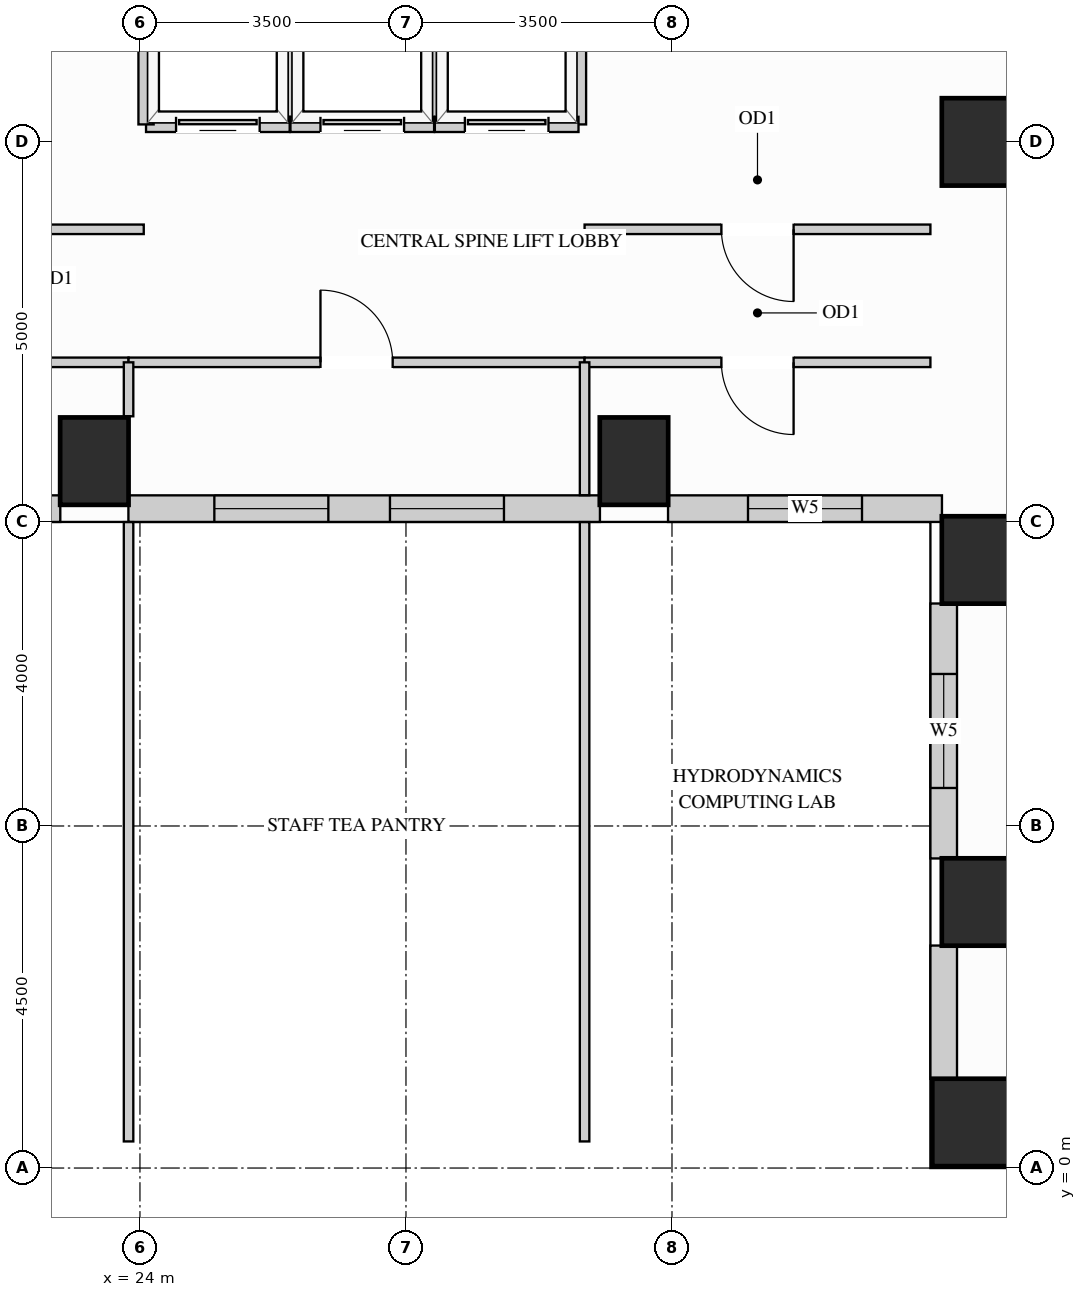
"""IFC4 building model, lengths in metres.
Left out: names, types, materials, properties, quantities, classifications, styles, units other than length and angle.
Written with IfcOpenShell. Run it as: python <this file> out.ifc"""

import sys

from ifc_helpers import new_model, si_unit, direction, frame, frame_2d, origin, origin_2d, place, context, subcontext, project, spatial, rectangle, extrude, source, transform, mapped, element, fill, save


model = new_model("IFC4")
c1 = context("Model", 3, precision=1e-05, world=origin(), true_north=direction((0.0, 1.0)))
c2 = subcontext(c1, "Body", "Model", "MODEL_VIEW")
j1 = project(units=[si_unit("LENGTHUNIT", "METRE"), si_unit("PLANEANGLEUNIT", "RADIAN")], contexts=[c1])
p1 = place(None, origin())
s1 = spatial("IfcSite", under=j1, at=p1, CompositionType="ELEMENT")
p2 = place(p1, origin())
s2 = spatial("IfcBuilding", under=s1, at=p2, CompositionType="ELEMENT")
p3 = place(p2, frame((0.0, 0.0, 120.6)))
s3 = spatial("IfcBuildingStorey", under=s2, at=p3, CompositionType="ELEMENT", Elevation=120.6)
m1 = source(origin(), c2, "Body", "SweptSolid", [
    extrude(rectangle(XDim=0.9, YDim=1.15, at=origin_2d()), origin(), (0.0, 0.0, 1.0), 3.38),
])
for number, where, z_axis, x_axis in (
    (1, (35.0, 13.5, 0.0), (0.0, 0.0, 1.0), (1.0, 0.0, 0.0)),
    (2, (35.0, 3.5, 0.0), (0.0, 0.0, 1.0), (1.0, 0.0, 0.0)),
    (3, (35.0, 8.0, 0.0), (0.0, 0.0, 1.0), (1.0, 0.0, 0.0)),
    (4, (23.4, 9.3, 0.0), (0.0, 0.0, 1.0), (1.0, 0.0, 0.0)),
    (5, (30.5, 9.3, 0.0), (0.0, 0.0, 1.0), (1.0, 0.0, 0.0)),
):
    element("IfcColumn", number, at=place(p3, frame(where, z_axis=z_axis, x_axis=x_axis)), inside=s3, PredefinedType="COLUMN", context=c2, shape_type="MappedRepresentation", body=[
        mapped(m1, transform((0.0, 0.0, 0.0), x_axis=(1.0, 0.0, 0.0), y_axis=(0.0, 1.0, 0.0), z_axis=(0.0, 0.0, 1.0))),
    ])
m2 = source(origin(), c2, "Body", "SweptSolid", [
    extrude(rectangle(XDim=1.15, YDim=1.15, at=origin_2d()), origin(), (0.0, 0.0, 1.0), 3.38),
])
p4 = place(p3, frame((35.0, 0.6, 0.0), z_axis=(0.0, 0.0, 1.0), x_axis=(1.0, 0.0, 0.0)))
e6 = element("IfcColumn", 6, at=p4, inside=s3, PredefinedType="COLUMN", context=c2, shape_type="MappedRepresentation", body=[
    mapped(m2, transform((0.0, 0.0, 0.0), x_axis=(1.0, 0.0, 0.0), y_axis=(0.0, 1.0, 0.0), z_axis=(0.0, 0.0, 1.0))),
])
p5 = place(p3, frame((19.448, 8.675, 0.0), z_axis=(0.0, 0.0, 1.0), x_axis=(1.0, 0.0, 0.0)))
e7 = element("IfcWall", 7, at=p5, inside=s3, PredefinedType="SOLIDWALL", context=c2, shape_type="SweptSolid", body=[
    extrude(rectangle(XDim=3.504, YDim=0.35, at=frame_2d((1.752, 0.0))), origin(), (0.0, 0.0, 1.0), 3.365),
])
p6 = place(p5, frame((1.002, 0.0, 0.78)))
e8 = element("IfcOpeningElement", 8, at=p6, cuts=e7, PredefinedType="OPENING", context=c2, shape_type="SweptSolid", body=[
    extrude(rectangle(XDim=1.5, YDim=2.0, at=frame_2d((0.75, 1.0))), frame((0.0, 0.185, 0.0), z_axis=(0.0, -1.0, 0.0), x_axis=(1.0, 0.0, 0.0)), (0.0, 0.0, 1.0), 0.37),
])
p7 = place(p3, frame((23.848, 8.675, 0.0), z_axis=(0.0, 0.0, 1.0), x_axis=(1.0, 0.0, 0.0)))
e9 = element("IfcWall", 9, at=p7, inside=s3, PredefinedType="SOLIDWALL", context=c2, shape_type="SweptSolid", body=[
    extrude(rectangle(XDim=6.204, YDim=0.35, at=frame_2d((3.102, 0.0))), origin(), (0.0, 0.0, 1.0), 3.365),
])
p8 = place(p7, frame((1.131, 0.0, 0.78)))
e10 = element("IfcOpeningElement", 10, at=p8, cuts=e9, PredefinedType="OPENING", context=c2, shape_type="SweptSolid", body=[
    extrude(rectangle(XDim=1.5, YDim=2.0, at=frame_2d((0.75, 1.0))), frame((0.0, 0.185, 0.0), z_axis=(0.0, -1.0, 0.0), x_axis=(1.0, 0.0, 0.0)), (0.0, 0.0, 1.0), 0.37),
])
p9 = place(p7, frame((3.441, 0.0, 0.78)))
e11 = element("IfcOpeningElement", 11, at=p9, cuts=e9, PredefinedType="OPENING", context=c2, shape_type="SweptSolid", body=[
    extrude(rectangle(XDim=1.5, YDim=2.0, at=frame_2d((0.75, 1.0))), frame((0.0, 0.185, 0.0), z_axis=(0.0, -1.0, 0.0), x_axis=(1.0, 0.0, 0.0)), (0.0, 0.0, 1.0), 0.37),
])
p10 = place(p3, frame((30.948, 8.675, 0.0), z_axis=(0.0, 0.0, 1.0), x_axis=(1.0, 0.0, 0.0)))
e12 = element("IfcWall", 12, at=p10, inside=s3, PredefinedType="SOLIDWALL", context=c2, shape_type="SweptSolid", body=[
    extrude(rectangle(XDim=3.604, YDim=0.35, at=frame_2d((1.802, 0.0))), origin(), (0.0, 0.0, 1.0), 3.365),
])
p11 = place(p10, frame((1.052, 0.0, 0.78)))
e13 = element("IfcOpeningElement", 13, at=p11, cuts=e12, PredefinedType="OPENING", context=c2, shape_type="SweptSolid", body=[
    extrude(rectangle(XDim=1.5, YDim=2.0, at=frame_2d((0.75, 1.0))), frame((0.0, 0.185, 0.0), z_axis=(0.0, -1.0, 0.0), x_axis=(1.0, 0.0, 0.0)), (0.0, 0.0, 1.0), 0.37),
])
p12 = place(p3, frame((34.575, 7.427, 0.0), z_axis=(0.0, 0.0, 1.0), x_axis=(0.0, -1.0, 0.0)))
e14 = element("IfcWall", 14, at=p12, inside=s3, PredefinedType="SOLIDWALL", context=c2, shape_type="SweptSolid", body=[
    extrude(rectangle(XDim=3.354, YDim=0.35, at=frame_2d((1.677, 0.0))), origin(), (0.0, 0.0, 1.0), 3.365),
])
p13 = place(p12, frame((0.927, 0.0, 0.78)))
e15 = element("IfcOpeningElement", 15, at=p13, cuts=e14, PredefinedType="OPENING", context=c2, shape_type="SweptSolid", body=[
    extrude(rectangle(XDim=1.5, YDim=2.0, at=frame_2d((0.75, 1.0))), frame((0.0, 0.185, 0.0), z_axis=(0.0, -1.0, 0.0), x_axis=(1.0, 0.0, 0.0)), (0.0, 0.0, 1.0), 0.37),
])
m3 = source(origin(), c2, "Body", "SweptSolid", [
    extrude(rectangle(XDim=1.754, YDim=0.35, at=frame_2d((0.877, 0.0))), origin(), (0.0, 0.0, 1.0), 3.365),
])
p14 = place(p3, frame((34.575, 2.927, 0.0), z_axis=(0.0, 0.0, 1.0), x_axis=(0.0, -1.0, 0.0)))
e16 = element("IfcWall", 16, at=p14, inside=s3, PredefinedType="SOLIDWALL", context=c2, shape_type="MappedRepresentation", body=[
    mapped(m3, transform((0.0, 0.0, 0.0), x_axis=(1.0, 0.0, 0.0), y_axis=(0.0, 1.0, 0.0), z_axis=(0.0, 0.0, 1.0))),
])
p15 = place(p3, frame((29.85, 12.35, 0.0), z_axis=(0.0, 0.0, 1.0), x_axis=(1.0, 0.0, 0.0)))
e17 = element("IfcWall", 17, at=p15, inside=s3, PredefinedType="PARTITIONING", context=c2, shape_type="SweptSolid", body=[
    extrude(rectangle(XDim=4.55, YDim=0.125, at=frame_2d((2.275, 0.0))), origin(), (0.0, 0.0, 1.0), 3.365),
])
p16 = place(p15, frame((1.8, 0.0, 0.0)))
e18 = element("IfcOpeningElement", 18, at=p16, cuts=e17, PredefinedType="OPENING", context=c2, shape_type="SweptSolid", body=[
    extrude(rectangle(XDim=0.95, YDim=2.15, at=frame_2d((0.475, 1.075))), frame((0.0, 0.073, 0.0), z_axis=(0.0, -1.0, 0.0), x_axis=(1.0, 0.0, 0.0)), (0.0, 0.0, 1.0), 0.145),
])
p17 = place(p3, frame((19.5, 12.35, 0.0), z_axis=(0.0, 0.0, 1.0), x_axis=(1.0, 0.0, 0.0)))
e19 = element("IfcWall", 19, at=p17, inside=s3, PredefinedType="PARTITIONING", context=c2, shape_type="SweptSolid", body=[
    extrude(rectangle(XDim=4.55, YDim=0.125, at=frame_2d((2.275, 0.0))), origin(), (0.0, 0.0, 1.0), 3.365),
])
p18 = place(p17, frame((1.8, 0.0, 0.0)))
e20 = element("IfcOpeningElement", 20, at=p18, cuts=e19, PredefinedType="OPENING", context=c2, shape_type="SweptSolid", body=[
    extrude(rectangle(XDim=0.95, YDim=2.15, at=frame_2d((0.475, 1.075))), frame((0.0, 0.073, 0.0), z_axis=(0.0, -1.0, 0.0), x_axis=(1.0, 0.0, 0.0)), (0.0, 0.0, 1.0), 0.145),
])
p19 = place(p3, frame((19.5, 10.6, 0.0), z_axis=(0.0, 0.0, 1.0), x_axis=(1.0, 0.0, 0.0)))
e21 = element("IfcWall", 21, at=p19, inside=s3, PredefinedType="PARTITIONING", context=c2, shape_type="SweptSolid", body=[
    extrude(rectangle(XDim=4.35, YDim=0.125, at=frame_2d((2.175, 0.0))), origin(), (0.0, 0.0, 1.0), 3.365),
])
p20 = place(p19, frame((1.7, 0.0, 0.0)))
e22 = element("IfcOpeningElement", 22, at=p20, cuts=e21, PredefinedType="OPENING", context=c2, shape_type="SweptSolid", body=[
    extrude(rectangle(XDim=0.95, YDim=2.15, at=frame_2d((0.475, 1.075))), frame((0.0, 0.073, 0.0), z_axis=(0.0, -1.0, 0.0), x_axis=(1.0, 0.0, 0.0)), (0.0, 0.0, 1.0), 0.145),
])
p21 = place(p3, frame((23.85, 10.6, 0.0), z_axis=(0.0, 0.0, 1.0), x_axis=(1.0, 0.0, 0.0)))
e23 = element("IfcWall", 23, at=p21, inside=s3, PredefinedType="PARTITIONING", context=c2, shape_type="SweptSolid", body=[
    extrude(rectangle(XDim=6.0, YDim=0.125, at=frame_2d((3.0, 0.0))), origin(), (0.0, 0.0, 1.0), 3.365),
])
p22 = place(p21, frame((2.525, 0.0, 0.0)))
e24 = element("IfcOpeningElement", 24, at=p22, cuts=e23, PredefinedType="OPENING", context=c2, shape_type="SweptSolid", body=[
    extrude(rectangle(XDim=0.95, YDim=2.15, at=frame_2d((0.475, 1.075))), frame((0.0, 0.073, 0.0), z_axis=(0.0, -1.0, 0.0), x_axis=(1.0, 0.0, 0.0)), (0.0, 0.0, 1.0), 0.145),
])
p23 = place(p3, frame((29.85, 10.6, 0.0), z_axis=(0.0, 0.0, 1.0), x_axis=(1.0, 0.0, 0.0)))
e25 = element("IfcWall", 25, at=p23, inside=s3, PredefinedType="PARTITIONING", context=c2, shape_type="SweptSolid", body=[
    extrude(rectangle(XDim=4.55, YDim=0.125, at=frame_2d((2.275, 0.0))), origin(), (0.0, 0.0, 1.0), 3.365),
])
p24 = place(p23, frame((1.8, 0.0, 0.0)))
e26 = element("IfcOpeningElement", 26, at=p24, cuts=e25, PredefinedType="OPENING", context=c2, shape_type="SweptSolid", body=[
    extrude(rectangle(XDim=0.95, YDim=2.15, at=frame_2d((0.475, 1.075))), frame((0.0, 0.073, 0.0), z_axis=(0.0, -1.0, 0.0), x_axis=(1.0, 0.0, 0.0)), (0.0, 0.0, 1.0), 0.145),
])
m4 = source(origin(), c2, "Body", "SweptSolid", [
    extrude(rectangle(XDim=8.148, YDim=0.125, at=frame_2d((4.074, 0.0))), origin(), (0.0, 0.0, 1.0), 3.365),
])
p25 = place(p3, frame((23.85, 0.35, 0.0), z_axis=(0.0, 0.0, 1.0), x_axis=(0.0, 1.0, 0.0)))
e27 = element("IfcWall", 27, at=p25, inside=s3, PredefinedType="PARTITIONING", context=c2, shape_type="MappedRepresentation", body=[
    mapped(m4, transform((0.0, 0.0, 0.0), x_axis=(1.0, 0.0, 0.0), y_axis=(0.0, 1.0, 0.0), z_axis=(0.0, 0.0, 1.0))),
])
m5 = source(origin(), c2, "Body", "SweptSolid", [
    extrude(rectangle(XDim=0.71, YDim=0.125, at=frame_2d((0.355, 0.0))), origin(), (0.0, 0.0, 1.0), 3.365),
])
p26 = place(p3, frame((23.85, 9.89, 0.0), z_axis=(0.0, 0.0, 1.0), x_axis=(0.0, 1.0, 0.0)))
e28 = element("IfcWall", 28, at=p26, inside=s3, PredefinedType="PARTITIONING", context=c2, shape_type="MappedRepresentation", body=[
    mapped(m5, transform((0.0, 0.0, 0.0), x_axis=(1.0, 0.0, 0.0), y_axis=(0.0, 1.0, 0.0), z_axis=(0.0, 0.0, 1.0))),
])
p27 = place(p3, frame((29.85, 0.35, 0.0), z_axis=(0.0, 0.0, 1.0), x_axis=(0.0, 1.0, 0.0)))
e29 = element("IfcWall", 29, at=p27, inside=s3, PredefinedType="PARTITIONING", context=c2, shape_type="MappedRepresentation", body=[
    mapped(m4, transform((0.0, 0.0, 0.0), x_axis=(1.0, 0.0, 0.0), y_axis=(0.0, 1.0, 0.0), z_axis=(0.0, 0.0, 1.0))),
])
m6 = source(origin(), c2, "Body", "SweptSolid", [
    extrude(rectangle(XDim=1.748, YDim=0.125, at=frame_2d((0.874, 0.0))), origin(), (0.0, 0.0, 1.0), 3.365),
])
p28 = place(p3, frame((29.85, 8.852, 0.0), z_axis=(0.0, 0.0, 1.0), x_axis=(0.0, 1.0, 0.0)))
e30 = element("IfcWall", 30, at=p28, inside=s3, PredefinedType="PARTITIONING", context=c2, shape_type="MappedRepresentation", body=[
    mapped(m6, transform((0.0, 0.0, 0.0), x_axis=(1.0, 0.0, 0.0), y_axis=(0.0, 1.0, 0.0), z_axis=(0.0, 0.0, 1.0))),
])
m7 = source(origin(), c2, "Body", "SweptSolid", [
    extrude(rectangle(XDim=2.29, YDim=0.2, at=frame_2d((1.145, 0.0))), origin(), (0.0, 0.0, 1.0), 3.365),
])
p29 = place(p3, frame((25.97, 13.73, 0.0), z_axis=(0.0, 0.0, 1.0), x_axis=(0.0, 1.0, 0.0)))
e31 = element("IfcWall", 31, at=p29, inside=s3, PredefinedType="PARTITIONING", context=c2, shape_type="MappedRepresentation", body=[
    mapped(m7, transform((0.0, 0.0, 0.0), x_axis=(1.0, 0.0, 0.0), y_axis=(0.0, 1.0, 0.0), z_axis=(0.0, 0.0, 1.0))),
])
p30 = place(p3, frame((24.08, 13.73, 0.0), z_axis=(0.0, 0.0, 1.0), x_axis=(1.0, 0.0, 0.0)))
e32 = element("IfcWall", 32, at=p30, inside=s3, PredefinedType="PARTITIONING", context=c2, shape_type="SweptSolid", body=[
    extrude(rectangle(XDim=1.89, YDim=0.2, at=frame_2d((0.945, 0.0))), origin(), (0.0, 0.0, 1.0), 2.446),
])
p31 = place(p30, frame((0.395, 0.0, 0.0)))
e33 = element("IfcOpeningElement", 33, at=p31, cuts=e32, PredefinedType="OPENING", context=c2, shape_type="SweptSolid", body=[
    extrude(rectangle(XDim=1.1, YDim=2.2, at=frame_2d((0.55, 1.1))), frame((0.0, 0.11, 0.0), z_axis=(0.0, -1.0, 0.0), x_axis=(1.0, 0.0, 0.0)), (0.0, 0.0, 1.0), 0.22),
])
for number, where, z_axis, x_axis in (
    (34, (24.08, 13.73, 0.0), (0.0, 0.0, 1.0), (0.0, 1.0, 0.0)),
    (35, (27.87, 13.73, 0.0), (0.0, 0.0, 1.0), (0.0, 1.0, 0.0)),
):
    element("IfcWall", number, at=place(p3, frame(where, z_axis=z_axis, x_axis=x_axis)), inside=s3, PredefinedType="PARTITIONING", context=c2, shape_type="MappedRepresentation", body=[
        mapped(m7, transform((0.0, 0.0, 0.0), x_axis=(1.0, 0.0, 0.0), y_axis=(0.0, 1.0, 0.0), z_axis=(0.0, 0.0, 1.0))),
    ])
p32 = place(p3, frame((25.98, 13.73, 0.0), z_axis=(0.0, 0.0, 1.0), x_axis=(1.0, 0.0, 0.0)))
e36 = element("IfcWall", 36, at=p32, inside=s3, PredefinedType="PARTITIONING", context=c2, shape_type="SweptSolid", body=[
    extrude(rectangle(XDim=1.89, YDim=0.2, at=frame_2d((0.945, 0.0))), origin(), (0.0, 0.0, 1.0), 2.446),
])
p33 = place(p32, frame((0.395, 0.0, 0.0)))
e37 = element("IfcOpeningElement", 37, at=p33, cuts=e36, PredefinedType="OPENING", context=c2, shape_type="SweptSolid", body=[
    extrude(rectangle(XDim=1.1, YDim=2.2, at=frame_2d((0.55, 1.1))), frame((0.0, 0.11, 0.0), z_axis=(0.0, -1.0, 0.0), x_axis=(1.0, 0.0, 0.0)), (0.0, 0.0, 1.0), 0.22),
])
p34 = place(p3, frame((29.77, 13.73, 0.0), z_axis=(0.0, 0.0, 1.0), x_axis=(0.0, 1.0, 0.0)))
e38 = element("IfcWall", 38, at=p34, inside=s3, PredefinedType="PARTITIONING", context=c2, shape_type="MappedRepresentation", body=[
    mapped(m7, transform((0.0, 0.0, 0.0), x_axis=(1.0, 0.0, 0.0), y_axis=(0.0, 1.0, 0.0), z_axis=(0.0, 0.0, 1.0))),
])
p35 = place(p3, frame((27.88, 13.73, 0.0), z_axis=(0.0, 0.0, 1.0), x_axis=(1.0, 0.0, 0.0)))
e39 = element("IfcWall", 39, at=p35, inside=s3, PredefinedType="PARTITIONING", context=c2, shape_type="SweptSolid", body=[
    extrude(rectangle(XDim=1.89, YDim=0.2, at=frame_2d((0.945, 0.0))), origin(), (0.0, 0.0, 1.0), 2.446),
])
p36 = place(p35, frame((0.395, 0.0, 0.0)))
e40 = element("IfcOpeningElement", 40, at=p36, cuts=e39, PredefinedType="OPENING", context=c2, shape_type="SweptSolid", body=[
    extrude(rectangle(XDim=1.1, YDim=2.2, at=frame_2d((0.55, 1.1))), frame((0.0, 0.11, 0.0), z_axis=(0.0, -1.0, 0.0), x_axis=(1.0, 0.0, 0.0)), (0.0, 0.0, 1.0), 0.22),
])
m8 = source(origin(), c2, "Body", "SweptSolid", [
    extrude(rectangle(XDim=1.1, YDim=2.2, at=frame_2d((0.55, 1.1))), frame((0.0, 0.025, 0.0), z_axis=(0.0, -1.0, 0.0), x_axis=(1.0, 0.0, 0.0)), (0.0, 0.0, 1.0), 0.05),
])
p37 = place(p31, origin())
e41 = element("IfcDoor", 41, at=p37, inside=s3, OperationType="SLIDING_TO_LEFT", PredefinedType="DOOR", context=c2, shape_type="MappedRepresentation", body=[
    mapped(m8, transform((0.0, 0.0, 0.0), x_axis=(1.0, 0.0, 0.0), y_axis=(0.0, 1.0, 0.0), z_axis=(0.0, 0.0, 1.0))),
])
fill(e33, e41)
p38 = place(p33, origin())
e42 = element("IfcDoor", 42, at=p38, inside=s3, OperationType="SLIDING_TO_LEFT", PredefinedType="DOOR", context=c2, shape_type="MappedRepresentation", body=[
    mapped(m8, transform((0.0, 0.0, 0.0), x_axis=(1.0, 0.0, 0.0), y_axis=(0.0, 1.0, 0.0), z_axis=(0.0, 0.0, 1.0))),
])
fill(e37, e42)
p39 = place(p36, origin())
e43 = element("IfcDoor", 43, at=p39, inside=s3, OperationType="SLIDING_TO_LEFT", PredefinedType="DOOR", context=c2, shape_type="MappedRepresentation", body=[
    mapped(m8, transform((0.0, 0.0, 0.0), x_axis=(1.0, 0.0, 0.0), y_axis=(0.0, 1.0, 0.0), z_axis=(0.0, 0.0, 1.0))),
])
fill(e40, e43)
m9 = source(origin(), c2, "Body", "SweptSolid", [
    extrude(rectangle(XDim=0.95, YDim=2.15, at=frame_2d((0.475, 1.075))), frame((0.0, 0.025, 0.0), z_axis=(0.0, -1.0, 0.0), x_axis=(1.0, 0.0, 0.0)), (0.0, 0.0, 1.0), 0.05),
])
p40 = place(p16, origin())
e44 = element("IfcDoor", 44, at=p40, inside=s3, OperationType="SINGLE_SWING_RIGHT", PredefinedType="DOOR", context=c2, shape_type="MappedRepresentation", body=[
    mapped(m9, transform((0.0, 0.0, 0.0), x_axis=(1.0, 0.0, 0.0), y_axis=(0.0, 1.0, 0.0), z_axis=(0.0, 0.0, 1.0))),
])
fill(e18, e44)
p41 = place(p22, origin())
e45 = element("IfcDoor", 45, at=p41, inside=s3, OperationType="SINGLE_SWING_LEFT", PredefinedType="DOOR", context=c2, shape_type="MappedRepresentation", body=[
    mapped(m9, transform((0.0, 0.0, 0.0), x_axis=(1.0, 0.0, 0.0), y_axis=(0.0, 1.0, 0.0), z_axis=(0.0, 0.0, 1.0))),
])
fill(e24, e45)
p42 = place(p24, origin())
e46 = element("IfcDoor", 46, at=p42, inside=s3, OperationType="SINGLE_SWING_RIGHT", PredefinedType="DOOR", context=c2, shape_type="MappedRepresentation", body=[
    mapped(m9, transform((0.0, 0.0, 0.0), x_axis=(1.0, 0.0, 0.0), y_axis=(0.0, 1.0, 0.0), z_axis=(0.0, 0.0, 1.0))),
])
fill(e26, e46)
m10 = source(origin(), c2, "Body", "SweptSolid", [
    extrude(rectangle(XDim=1.5, YDim=2.0, at=frame_2d((0.75, 1.0))), frame((0.0, 0.03, 0.0), z_axis=(0.0, -1.0, 0.0), x_axis=(1.0, 0.0, 0.0)), (0.0, 0.0, 1.0), 0.06),
])
p43 = place(p8, origin())
e47 = element("IfcWindow", 47, at=p43, inside=s3, PartitioningType="SINGLE_PANEL", PredefinedType="WINDOW", context=c2, shape_type="MappedRepresentation", body=[
    mapped(m10, transform((0.0, 0.0, 0.0), x_axis=(1.0, 0.0, 0.0), y_axis=(0.0, 1.0, 0.0), z_axis=(0.0, 0.0, 1.0))),
])
fill(e10, e47)
p44 = place(p9, origin())
e48 = element("IfcWindow", 48, at=p44, inside=s3, PartitioningType="SINGLE_PANEL", PredefinedType="WINDOW", context=c2, shape_type="MappedRepresentation", body=[
    mapped(m10, transform((0.0, 0.0, 0.0), x_axis=(1.0, 0.0, 0.0), y_axis=(0.0, 1.0, 0.0), z_axis=(0.0, 0.0, 1.0))),
])
fill(e11, e48)
p45 = place(p11, origin())
e49 = element("IfcWindow", 49, at=p45, inside=s3, PartitioningType="SINGLE_PANEL", PredefinedType="WINDOW", context=c2, shape_type="MappedRepresentation", body=[
    mapped(m10, transform((0.0, 0.0, 0.0), x_axis=(1.0, 0.0, 0.0), y_axis=(0.0, 1.0, 0.0), z_axis=(0.0, 0.0, 1.0))),
])
fill(e13, e49)
p46 = place(p13, origin())
e50 = element("IfcWindow", 50, at=p46, inside=s3, PartitioningType="SINGLE_PANEL", PredefinedType="WINDOW", context=c2, shape_type="MappedRepresentation", body=[
    mapped(m10, transform((0.0, 0.0, 0.0), x_axis=(1.0, 0.0, 0.0), y_axis=(0.0, 1.0, 0.0), z_axis=(0.0, 0.0, 1.0))),
])
fill(e15, e50)
save(model, sys.argv[1])
